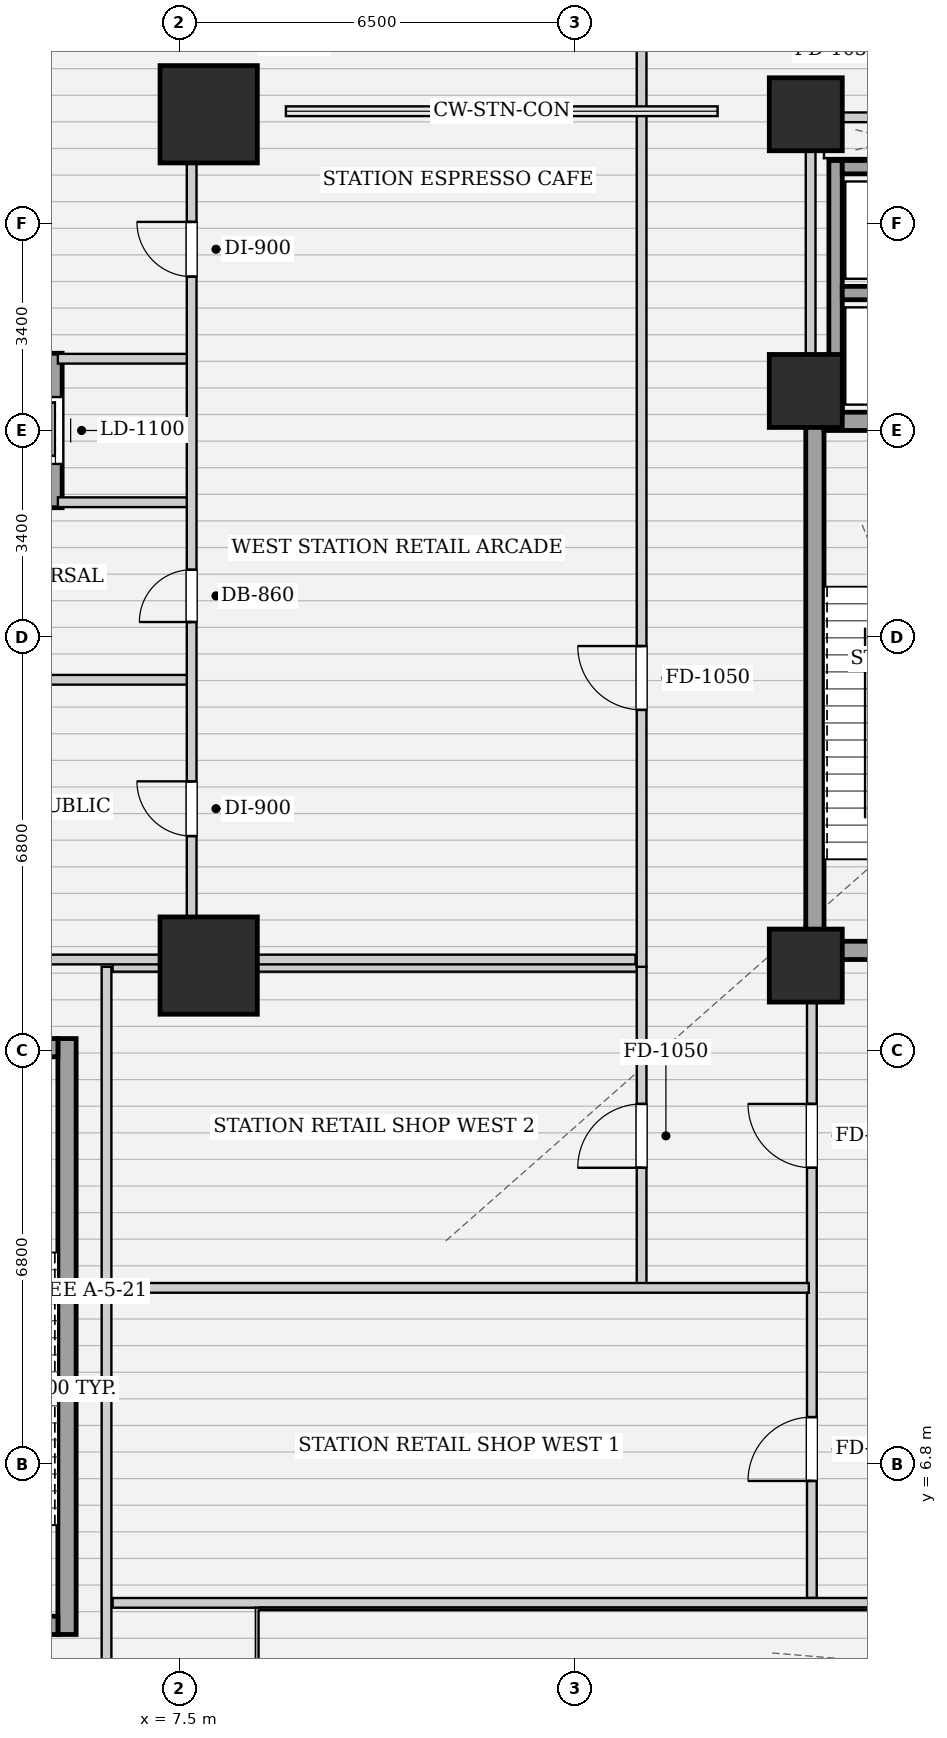
"""IFC4 building model, lengths in metres.
Left out: names, types, materials, properties, quantities, classifications, styles, units other than length and angle.
Written with IfcOpenShell. Run it as: python <this file> out.ifc"""

import sys

from ifc_helpers import new_model, si_unit, direction, frame, frame_2d, origin, origin_2d, place, context, subcontext, project, spatial, rectangle, extrude, element, fill, save


model = new_model("IFC4")
c1 = context("Model", 3, precision=1e-05, world=origin(), true_north=direction((0.0, 1.0)))
c2 = subcontext(c1, "Body", "Model", "MODEL_VIEW")
j1 = project(units=[si_unit("LENGTHUNIT", "METRE"), si_unit("PLANEANGLEUNIT", "RADIAN")], contexts=[c1])
p1 = place(None, origin())
s1 = spatial("IfcSite", under=j1, at=p1, CompositionType="ELEMENT")
p2 = place(p1, origin())
s2 = spatial("IfcBuilding", under=s1, at=p2, CompositionType="ELEMENT")
p3 = place(p2, origin())
s3 = spatial("IfcBuildingStorey", under=s2, at=p3, CompositionType="ELEMENT", Elevation=0.0)
for number, where, z_axis, x_axis in (
    (1, (7.98, 15.0, 0.0), (0.0, 0.0, 1.0), (1.0, 0.0, 0.0)),
    (2, (7.98, 29.0, 0.0), (0.0, 0.0, 1.0), (1.0, 0.0, 0.0)),
):
    element("IfcColumn", number, at=place(p3, frame(where, z_axis=z_axis, x_axis=x_axis)), inside=s3, PredefinedType="COLUMN", context=c2, shape_type="SweptSolid", body=[
        extrude(rectangle(XDim=1.6, YDim=1.6, at=origin_2d()), origin(), (0.0, 0.0, 1.0), 6.0),
    ])
for number, where, z_axis, x_axis in (
    (3, (17.8, 15.0, 0.0), (0.0, 0.0, 1.0), (1.0, 0.0, 0.0)),
    (4, (17.8, 29.0, 0.0), (0.0, 0.0, 1.0), (1.0, 0.0, 0.0)),
    (5, (17.8, 24.45, 0.0), (0.0, 0.0, 1.0), (1.0, 0.0, 0.0)),
):
    element("IfcColumn", number, at=place(p3, frame(where, z_axis=z_axis, x_axis=x_axis)), inside=s3, PredefinedType="COLUMN", context=c2, shape_type="SweptSolid", body=[
        extrude(rectangle(XDim=1.2, YDim=1.2, at=origin_2d()), origin(), (0.0, 0.0, 1.0), 6.0),
    ])
p4 = place(p3, frame((17.95, 15.1, 0.0), z_axis=(0.0, 0.0, 1.0), x_axis=(0.0, 1.0, 0.0)))
e6 = element("IfcWall", 6, at=p4, inside=s3, PredefinedType="SHEAR", context=c2, shape_type="SweptSolid", body=[
    extrude(rectangle(XDim=9.0, YDim=0.3, at=frame_2d((4.5, 0.0))), origin(), (0.0, 0.0, 1.0), 5.68),
])
p5 = place(p3, frame((18.1, 23.95, 0.0), z_axis=(0.0, 0.0, 1.0), x_axis=(1.0, 0.0, 0.0)))
e7 = element("IfcWall", 7, at=p5, inside=s3, PredefinedType="SHEAR", context=c2, shape_type="SweptSolid", body=[
    extrude(rectangle(XDim=2.85, YDim=0.3, at=frame_2d((1.425, 0.0))), origin(), (0.0, 0.0, 1.0), 5.68),
])
p6 = place(p3, frame((18.1, 15.25, 0.0), z_axis=(0.0, 0.0, 1.0), x_axis=(1.0, 0.0, 0.0)))
e8 = element("IfcWall", 8, at=p6, inside=s3, PredefinedType="SHEAR", context=c2, shape_type="SweptSolid", body=[
    extrude(rectangle(XDim=2.85, YDim=0.3, at=frame_2d((1.425, 0.0))), origin(), (0.0, 0.0, 1.0), 5.68),
])
p7 = place(p6, frame((0.86, 0.0, 0.0)))
e9 = element("IfcOpeningElement", 9, at=p7, cuts=e8, PredefinedType="OPENING", context=c2, shape_type="SweptSolid", body=[
    extrude(rectangle(XDim=1.1, YDim=2.05, at=frame_2d((0.55, 1.025))), frame((0.0, 0.16, 0.0), z_axis=(0.0, -1.0, 0.0), x_axis=(1.0, 0.0, 0.0)), (0.0, 0.0, 1.0), 0.32),
])
p8 = place(p3, frame((5.65, 4.0, 0.0), z_axis=(0.0, 0.0, 1.0), x_axis=(0.0, 1.0, 0.0)))
e10 = element("IfcWall", 10, at=p8, inside=s3, PredefinedType="SHEAR", context=c2, shape_type="SweptSolid", body=[
    extrude(rectangle(XDim=9.8, YDim=0.3, at=frame_2d((4.9, 0.0))), origin(), (0.0, 0.0, 1.0), 5.68),
])
p9 = place(p3, frame((2.35, 13.65, 0.0), z_axis=(0.0, 0.0, 1.0), x_axis=(1.0, 0.0, 0.0)))
e11 = element("IfcWall", 11, at=p9, inside=s3, PredefinedType="SHEAR", context=c2, shape_type="SweptSolid", body=[
    extrude(rectangle(XDim=3.15, YDim=0.3, at=frame_2d((1.575, 0.0))), origin(), (0.0, 0.0, 1.0), 5.68),
])
p10 = place(p3, frame((2.35, 4.15, 0.0), z_axis=(0.0, 0.0, 1.0), x_axis=(1.0, 0.0, 0.0)))
e12 = element("IfcWall", 12, at=p10, inside=s3, PredefinedType="SHEAR", context=c2, shape_type="SweptSolid", body=[
    extrude(rectangle(XDim=3.15, YDim=0.3, at=frame_2d((1.575, 0.0))), origin(), (0.0, 0.0, 1.0), 5.68),
])
p11 = place(p10, frame((1.02, 0.0, 0.0)))
e13 = element("IfcOpeningElement", 13, at=p11, cuts=e12, PredefinedType="OPENING", context=c2, shape_type="SweptSolid", body=[
    extrude(rectangle(XDim=1.1, YDim=2.05, at=frame_2d((0.55, 1.025))), frame((0.0, 0.16, 0.0), z_axis=(0.0, -1.0, 0.0), x_axis=(1.0, 0.0, 0.0)), (0.0, 0.0, 1.0), 0.32),
])
p12 = place(p3, frame((18.29, 24.1, 0.0), z_axis=(0.0, 0.0, 1.0), x_axis=(0.0, 1.0, 0.0)))
e14 = element("IfcWall", 14, at=p12, inside=s3, PredefinedType="SHEAR", context=c2, shape_type="SweptSolid", body=[
    extrude(rectangle(XDim=4.14, YDim=0.22, at=frame_2d((2.07, 0.0))), origin(), (0.0, 0.0, 1.0), 5.68),
])
for number, where, z_axis, x_axis in (
    (15, (18.4, 26.06, 0.0), (0.0, 0.0, 1.0), (1.0, 0.0, 0.0)),
    (16, (18.4, 28.13, 0.0), (0.0, 0.0, 1.0), (1.0, 0.0, 0.0)),
):
    element("IfcWall", number, at=place(p3, frame(where, z_axis=z_axis, x_axis=x_axis)), inside=s3, PredefinedType="SHEAR", context=c2, shape_type="SweptSolid", body=[
        extrude(rectangle(XDim=1.9, YDim=0.22, at=frame_2d((0.95, 0.0))), origin(), (0.0, 0.0, 1.0), 5.68),
    ])
p13 = place(p3, frame((5.46, 22.53, 0.0), z_axis=(0.0, 0.0, 1.0), x_axis=(0.0, 1.0, 0.0)))
e17 = element("IfcWall", 17, at=p13, inside=s3, PredefinedType="SHEAR", context=c2, shape_type="SweptSolid", body=[
    extrude(rectangle(XDim=2.54, YDim=0.22, at=frame_2d((1.27, 0.0))), origin(), (0.0, 0.0, 1.0), 5.68),
])
p14 = place(p13, frame((0.72, 0.0, 0.0)))
e18 = element("IfcOpeningElement", 18, at=p14, cuts=e17, PredefinedType="OPENING", context=c2, shape_type="SweptSolid", body=[
    extrude(rectangle(XDim=1.1, YDim=2.15, at=frame_2d((0.55, 1.075))), frame((0.0, 0.12, 0.0), z_axis=(0.0, -1.0, 0.0), x_axis=(1.0, 0.0, 0.0)), (0.0, 0.0, 1.0), 0.24),
])
p15 = place(p3, frame((17.88, 24.12, 0.0), z_axis=(0.0, 0.0, 1.0), x_axis=(0.0, 1.0, 0.0)))
e19 = element("IfcWall", 19, at=p15, inside=s3, PredefinedType="PARTITIONING", context=c2, shape_type="SweptSolid", body=[
    extrude(rectangle(XDim=4.76, YDim=0.16, at=frame_2d((2.38, 0.0))), origin(), (0.0, 0.0, 1.0), 5.68),
])
p16 = place(p3, frame((17.96, 28.95, 0.0), z_axis=(0.0, 0.0, 1.0), x_axis=(1.0, 0.0, 0.0)))
e20 = element("IfcWall", 20, at=p16, inside=s3, PredefinedType="PARTITIONING", context=c2, shape_type="SweptSolid", body=[
    extrude(rectangle(XDim=4.29, YDim=0.16, at=frame_2d((2.145, 0.0))), origin(), (0.0, 0.0, 1.0), 5.68),
])
p17 = place(p16, frame((1.57, 0.0, 0.0)))
e21 = element("IfcOpeningElement", 21, at=p17, cuts=e20, PredefinedType="OPENING", context=c2, shape_type="SweptSolid", body=[
    extrude(rectangle(XDim=0.86, YDim=2.05, at=frame_2d((0.43, 1.025))), frame((0.0, 0.09, 0.0), z_axis=(0.0, -1.0, 0.0), x_axis=(1.0, 0.0, 0.0)), (0.0, 0.0, 1.0), 0.18),
])
p18 = place(p3, frame((17.9, 4.6, 0.0), z_axis=(0.0, 0.0, 1.0), x_axis=(0.0, 1.0, 0.0)))
e22 = element("IfcWall", 22, at=p18, inside=s3, PredefinedType="PARTITIONING", context=c2, shape_type="SweptSolid", body=[
    extrude(rectangle(XDim=10.38, YDim=0.16, at=frame_2d((5.19, 0.0))), origin(), (0.0, 0.0, 1.0), 4.565),
])
p19 = place(p18, frame((1.925, 0.0, 0.0)))
e23 = element("IfcOpeningElement", 23, at=p19, cuts=e22, PredefinedType="OPENING", context=c2, shape_type="SweptSolid", body=[
    extrude(rectangle(XDim=1.05, YDim=2.05, at=frame_2d((0.525, 1.025))), frame((0.0, 0.09, 0.0), z_axis=(0.0, -1.0, 0.0), x_axis=(1.0, 0.0, 0.0)), (0.0, 0.0, 1.0), 0.18),
])
p20 = place(p18, frame((7.075, 0.0, 0.0)))
e24 = element("IfcOpeningElement", 24, at=p20, cuts=e22, PredefinedType="OPENING", context=c2, shape_type="SweptSolid", body=[
    extrude(rectangle(XDim=1.05, YDim=2.05, at=frame_2d((0.525, 1.025))), frame((0.0, 0.09, 0.0), z_axis=(0.0, -1.0, 0.0), x_axis=(1.0, 0.0, 0.0)), (0.0, 0.0, 1.0), 0.18),
])
p21 = place(p3, frame((6.4, 14.98, 0.0), z_axis=(0.0, 0.0, 1.0), x_axis=(1.0, 0.0, 0.0)))
e25 = element("IfcWall", 25, at=p21, inside=s3, PredefinedType="PARTITIONING", context=c2, shape_type="SweptSolid", body=[
    extrude(rectangle(XDim=8.7, YDim=0.16, at=frame_2d((4.35, 0.0))), origin(), (0.0, 0.0, 1.0), 4.565),
])
p22 = place(p3, frame((15.1, 9.7, 0.0), z_axis=(0.0, 0.0, 1.0), x_axis=(0.0, 1.0, 0.0)))
e26 = element("IfcWall", 26, at=p22, inside=s3, PredefinedType="PARTITIONING", context=c2, shape_type="SweptSolid", body=[
    extrude(rectangle(XDim=5.28, YDim=0.16, at=frame_2d((2.64, 0.0))), origin(), (0.0, 0.0, 1.0), 5.68),
])
p23 = place(p22, frame((1.975, 0.0, 0.0)))
e27 = element("IfcOpeningElement", 27, at=p23, cuts=e26, PredefinedType="OPENING", context=c2, shape_type="SweptSolid", body=[
    extrude(rectangle(XDim=1.05, YDim=2.05, at=frame_2d((0.525, 1.025))), frame((0.0, 0.09, 0.0), z_axis=(0.0, -1.0, 0.0), x_axis=(1.0, 0.0, 0.0)), (0.0, 0.0, 1.0), 0.18),
])
p24 = place(p3, frame((6.4, 4.52, 0.0), z_axis=(0.0, 0.0, 1.0), x_axis=(1.0, 0.0, 0.0)))
e28 = element("IfcWall", 28, at=p24, inside=s3, PredefinedType="PARTITIONING", context=c2, shape_type="SweptSolid", body=[
    extrude(rectangle(XDim=40.9, YDim=0.16, at=frame_2d((20.45, 0.0))), origin(), (0.0, 0.0, 1.0), 5.68),
])
p25 = place(p3, frame((6.3, 0.3, 0.0), z_axis=(0.0, 0.0, 1.0), x_axis=(0.0, 1.0, 0.0)))
e29 = element("IfcWall", 29, at=p25, inside=s3, PredefinedType="PARTITIONING", context=c2, shape_type="SweptSolid", body=[
    extrude(rectangle(XDim=14.68, YDim=0.16, at=frame_2d((7.34, 0.0))), origin(), (0.0, 0.0, 1.0), 5.68),
])
p26 = place(p3, frame((6.4, 9.7, 0.0), z_axis=(0.0, 0.0, 1.0), x_axis=(1.0, 0.0, 0.0)))
e30 = element("IfcWall", 30, at=p26, inside=s3, PredefinedType="PARTITIONING", context=c2, shape_type="SweptSolid", body=[
    extrude(rectangle(XDim=11.45, YDim=0.16, at=frame_2d((5.725, 0.0))), origin(), (0.0, 0.0, 1.0), 5.68),
])
p27 = place(p3, frame((15.1, 14.98, 0.0), z_axis=(0.0, 0.0, 1.0), x_axis=(0.0, 1.0, 0.0)))
e31 = element("IfcWall", 31, at=p27, inside=s3, PredefinedType="PARTITIONING", context=c2, shape_type="SweptSolid", body=[
    extrude(rectangle(XDim=15.97, YDim=0.16, at=frame_2d((7.985, 0.0))), origin(), (0.0, 0.0, 1.0), 5.68),
])
p28 = place(p27, frame((4.225, 0.0, 0.0)))
e32 = element("IfcOpeningElement", 32, at=p28, cuts=e31, PredefinedType="OPENING", context=c2, shape_type="SweptSolid", body=[
    extrude(rectangle(XDim=1.05, YDim=2.05, at=frame_2d((0.525, 1.025))), frame((0.0, 0.09, 0.0), z_axis=(0.0, -1.0, 0.0), x_axis=(1.0, 0.0, 0.0)), (0.0, 0.0, 1.0), 0.18),
])
p29 = place(p3, frame((0.3, 15.1, 0.0), z_axis=(0.0, 0.0, 1.0), x_axis=(1.0, 0.0, 0.0)))
e33 = element("IfcWall", 33, at=p29, inside=s3, PredefinedType="PARTITIONING", context=c2, shape_type="SweptSolid", body=[
    extrude(rectangle(XDim=14.7, YDim=0.16, at=frame_2d((7.35, 0.0))), origin(), (0.0, 0.0, 1.0), 4.565),
])
p30 = place(p3, frame((7.7, 15.18, 0.0), z_axis=(0.0, 0.0, 1.0), x_axis=(0.0, 1.0, 0.0)))
e34 = element("IfcWall", 34, at=p30, inside=s3, PredefinedType="PARTITIONING", context=c2, shape_type="SweptSolid", body=[
    extrude(rectangle(XDim=13.7, YDim=0.16, at=frame_2d((6.85, 0.0))), origin(), (0.0, 0.0, 1.0), 5.68),
])
p31 = place(p30, frame((1.95, 0.0, 0.0)))
e35 = element("IfcOpeningElement", 35, at=p31, cuts=e34, PredefinedType="OPENING", context=c2, shape_type="SweptSolid", body=[
    extrude(rectangle(XDim=0.9, YDim=2.05, at=frame_2d((0.45, 1.025))), frame((0.0, 0.09, 0.0), z_axis=(0.0, -1.0, 0.0), x_axis=(1.0, 0.0, 0.0)), (0.0, 0.0, 1.0), 0.18),
])
p32 = place(p30, frame((5.47, 0.0, 0.0)))
e36 = element("IfcOpeningElement", 36, at=p32, cuts=e34, PredefinedType="OPENING", context=c2, shape_type="SweptSolid", body=[
    extrude(rectangle(XDim=0.86, YDim=2.05, at=frame_2d((0.43, 1.025))), frame((0.0, 0.09, 0.0), z_axis=(0.0, -1.0, 0.0), x_axis=(1.0, 0.0, 0.0)), (0.0, 0.0, 1.0), 0.18),
])
p33 = place(p30, frame((11.15, 0.0, 0.0)))
e37 = element("IfcOpeningElement", 37, at=p33, cuts=e34, PredefinedType="OPENING", context=c2, shape_type="SweptSolid", body=[
    extrude(rectangle(XDim=0.9, YDim=2.05, at=frame_2d((0.45, 1.025))), frame((0.0, 0.09, 0.0), z_axis=(0.0, -1.0, 0.0), x_axis=(1.0, 0.0, 0.0)), (0.0, 0.0, 1.0), 0.18),
])
p34 = place(p3, frame((0.3, 19.7, 0.0), z_axis=(0.0, 0.0, 1.0), x_axis=(1.0, 0.0, 0.0)))
e38 = element("IfcWall", 38, at=p34, inside=s3, PredefinedType="PARTITIONING", context=c2, shape_type="SweptSolid", body=[
    extrude(rectangle(XDim=7.32, YDim=0.16, at=frame_2d((3.66, 0.0))), origin(), (0.0, 0.0, 1.0), 5.68),
])
for number, where, z_axis, x_axis in (
    (39, (5.5, 22.62, 0.0), (0.0, 0.0, 1.0), (1.0, 0.0, 0.0)),
    (40, (5.5, 24.98, 0.0), (0.0, 0.0, 1.0), (1.0, 0.0, 0.0)),
):
    element("IfcWall", number, at=place(p3, frame(where, z_axis=z_axis, x_axis=x_axis)), inside=s3, PredefinedType="PARTITIONING", context=c2, shape_type="SweptSolid", body=[
        extrude(rectangle(XDim=2.12, YDim=0.16, at=frame_2d((1.06, 0.0))), origin(), (0.0, 0.0, 1.0), 5.68),
    ])
p35 = place(p14, origin())
e41 = element("IfcDoor", 41, at=p35, inside=s3, OperationType="SLIDING_TO_LEFT", PredefinedType="DOOR", context=c2, shape_type="SweptSolid", body=[
    extrude(rectangle(XDim=1.1, YDim=2.15, at=frame_2d((0.55, 1.075))), frame((0.0, 0.025, 0.0), z_axis=(0.0, -1.0, 0.0), x_axis=(1.0, 0.0, 0.0)), (0.0, 0.0, 1.0), 0.05),
])
fill(e18, e41)
p36 = place(p19, origin())
e42 = element("IfcDoor", 42, at=p36, inside=s3, OperationType="SINGLE_SWING_LEFT", PredefinedType="DOOR", context=c2, shape_type="SweptSolid", body=[
    extrude(rectangle(XDim=1.05, YDim=2.05, at=frame_2d((0.525, 1.025))), frame((0.0, 0.025, 0.0), z_axis=(0.0, -1.0, 0.0), x_axis=(1.0, 0.0, 0.0)), (0.0, 0.0, 1.0), 0.05),
])
fill(e23, e42)
p37 = place(p20, origin())
e43 = element("IfcDoor", 43, at=p37, inside=s3, OperationType="SINGLE_SWING_RIGHT", PredefinedType="DOOR", context=c2, shape_type="SweptSolid", body=[
    extrude(rectangle(XDim=1.05, YDim=2.05, at=frame_2d((0.525, 1.025))), frame((0.0, 0.025, 0.0), z_axis=(0.0, -1.0, 0.0), x_axis=(1.0, 0.0, 0.0)), (0.0, 0.0, 1.0), 0.05),
])
fill(e24, e43)
p38 = place(p23, origin())
e44 = element("IfcDoor", 44, at=p38, inside=s3, OperationType="SINGLE_SWING_LEFT", PredefinedType="DOOR", context=c2, shape_type="SweptSolid", body=[
    extrude(rectangle(XDim=1.05, YDim=2.05, at=frame_2d((0.525, 1.025))), frame((0.0, 0.025, 0.0), z_axis=(0.0, -1.0, 0.0), x_axis=(1.0, 0.0, 0.0)), (0.0, 0.0, 1.0), 0.05),
])
fill(e27, e44)
p39 = place(p28, origin())
e45 = element("IfcDoor", 45, at=p39, inside=s3, OperationType="SINGLE_SWING_RIGHT", PredefinedType="DOOR", context=c2, shape_type="SweptSolid", body=[
    extrude(rectangle(XDim=1.05, YDim=2.05, at=frame_2d((0.525, 1.025))), frame((0.0, 0.025, 0.0), z_axis=(0.0, -1.0, 0.0), x_axis=(1.0, 0.0, 0.0)), (0.0, 0.0, 1.0), 0.05),
])
fill(e32, e45)
p40 = place(p31, origin())
e46 = element("IfcDoor", 46, at=p40, inside=s3, OperationType="SINGLE_SWING_RIGHT", PredefinedType="DOOR", context=c2, shape_type="SweptSolid", body=[
    extrude(rectangle(XDim=0.9, YDim=2.05, at=frame_2d((0.45, 1.025))), frame((0.0, 0.025, 0.0), z_axis=(0.0, -1.0, 0.0), x_axis=(1.0, 0.0, 0.0)), (0.0, 0.0, 1.0), 0.05),
])
fill(e35, e46)
p41 = place(p32, origin())
e47 = element("IfcDoor", 47, at=p41, inside=s3, OperationType="SINGLE_SWING_LEFT", PredefinedType="DOOR", context=c2, shape_type="SweptSolid", body=[
    extrude(rectangle(XDim=0.86, YDim=2.05, at=frame_2d((0.43, 1.025))), frame((0.0, 0.025, 0.0), z_axis=(0.0, -1.0, 0.0), x_axis=(1.0, 0.0, 0.0)), (0.0, 0.0, 1.0), 0.05),
])
fill(e36, e47)
p42 = place(p33, origin())
e48 = element("IfcDoor", 48, at=p42, inside=s3, OperationType="SINGLE_SWING_RIGHT", PredefinedType="DOOR", context=c2, shape_type="SweptSolid", body=[
    extrude(rectangle(XDim=0.9, YDim=2.05, at=frame_2d((0.45, 1.025))), frame((0.0, 0.025, 0.0), z_axis=(0.0, -1.0, 0.0), x_axis=(1.0, 0.0, 0.0)), (0.0, 0.0, 1.0), 0.05),
])
fill(e37, e48)
save(model, sys.argv[1])
